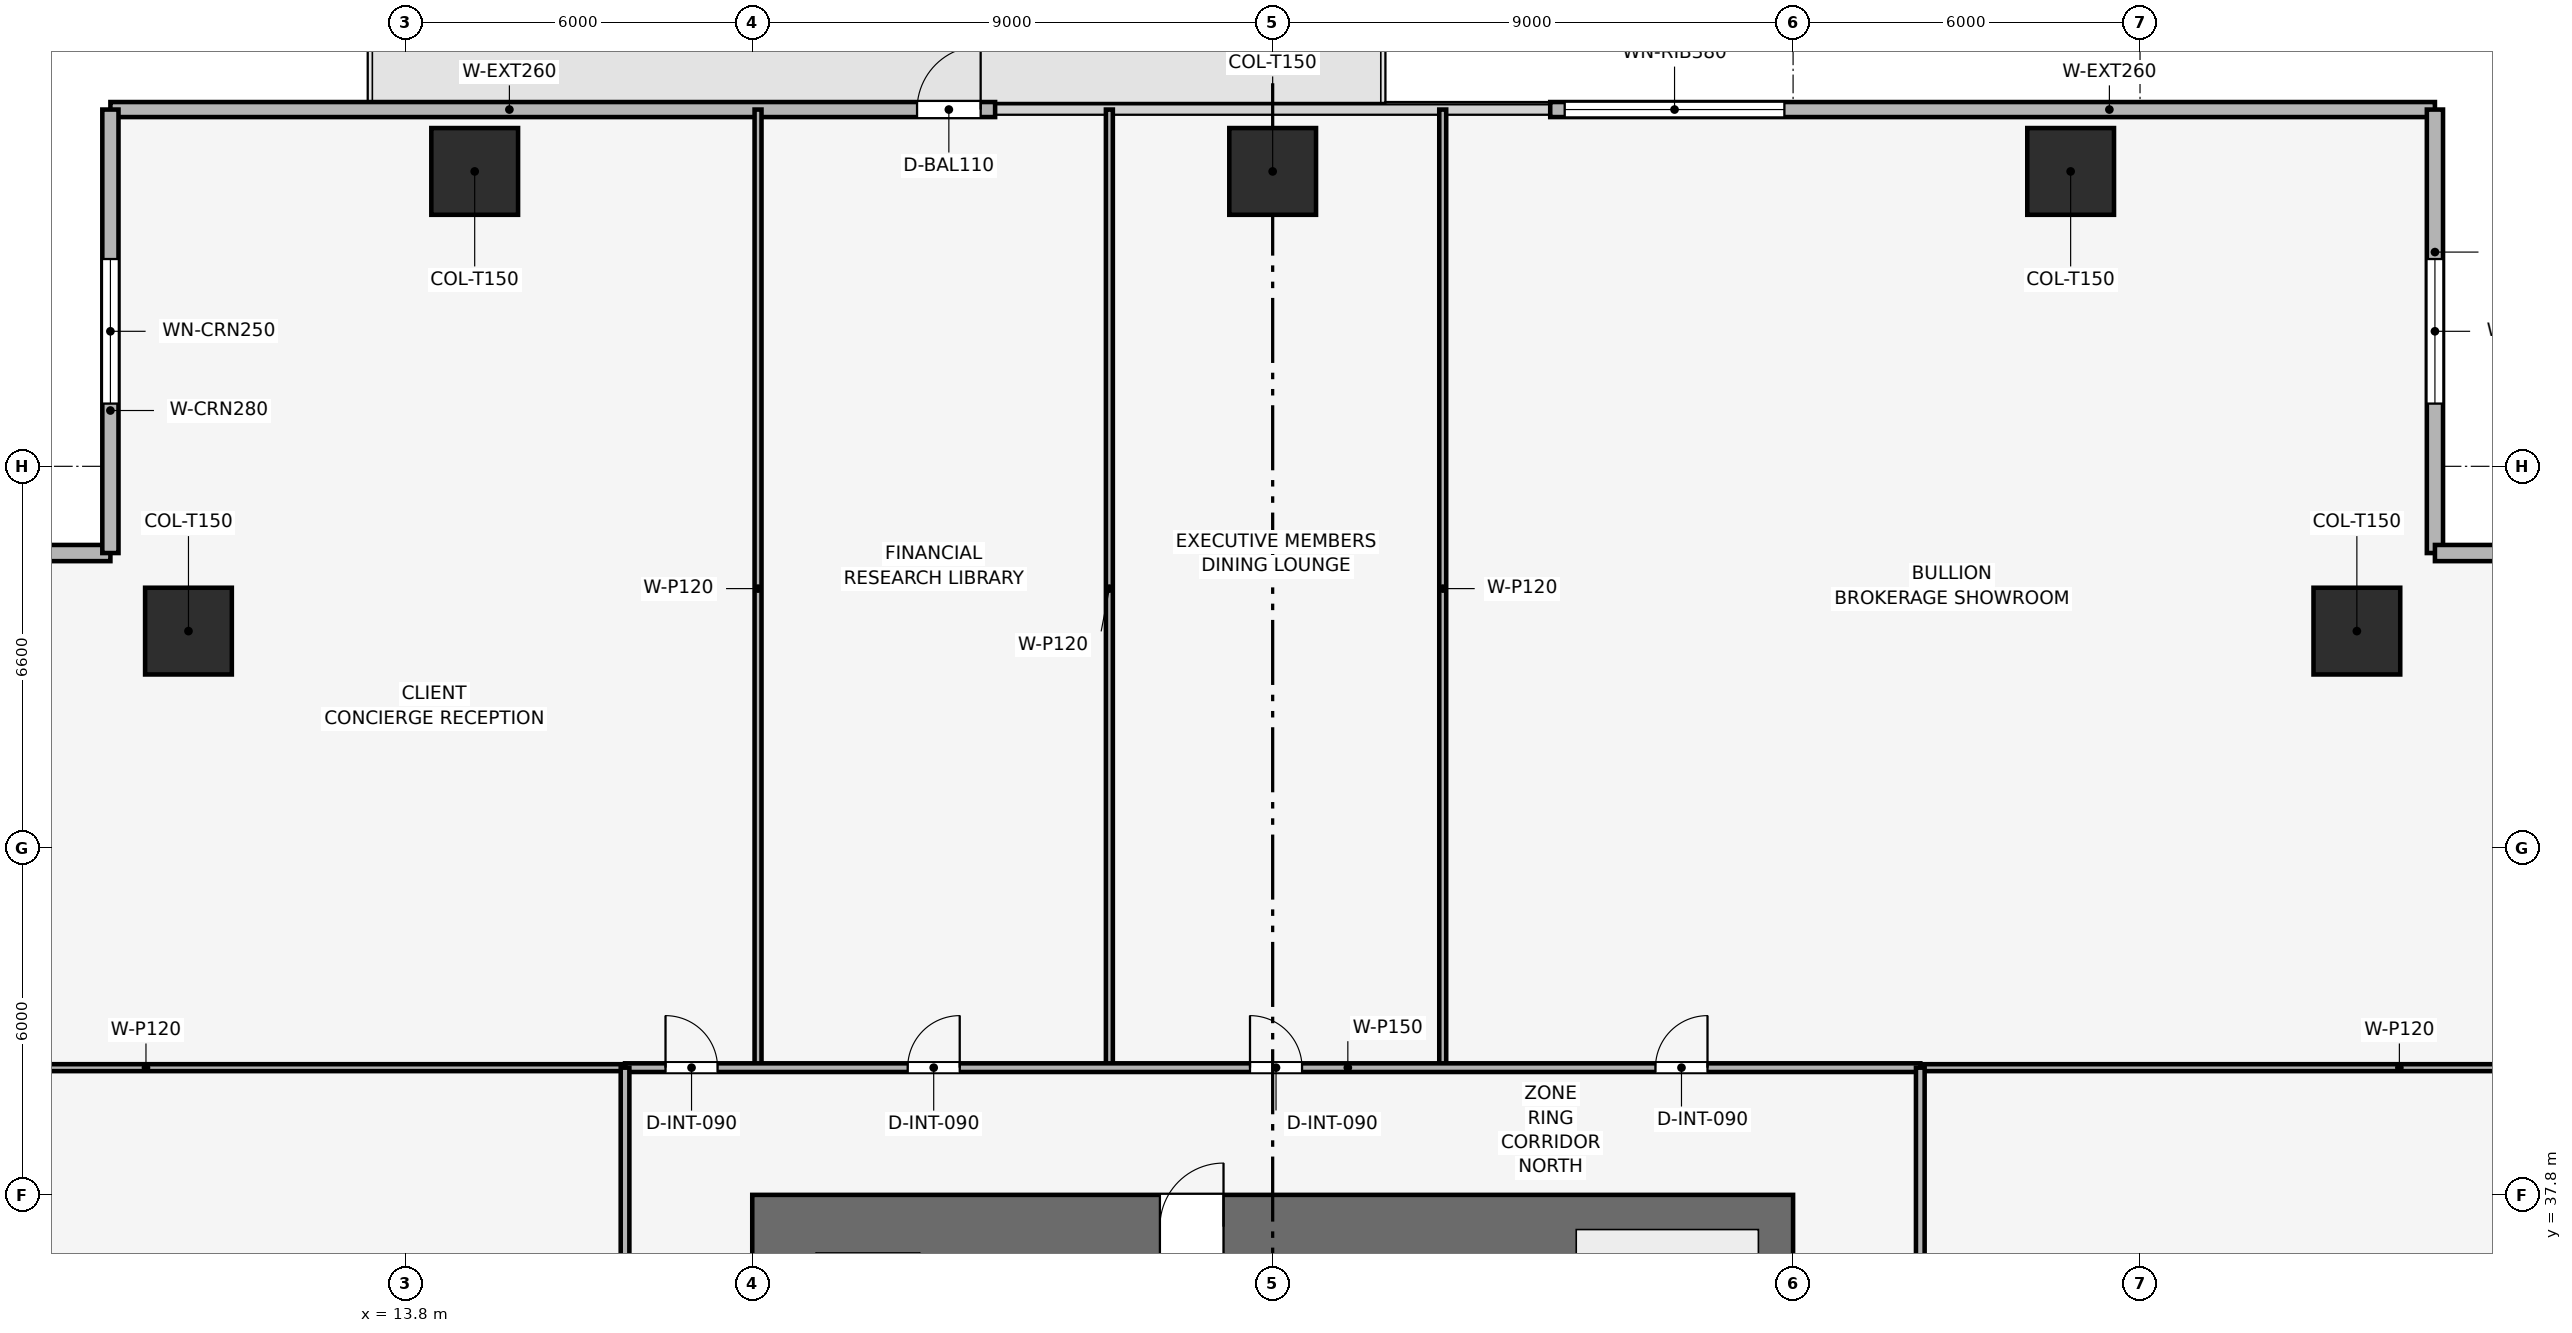
"""IFC4 building model, lengths in metres.
Left out: names, types, materials, properties, quantities, classifications, styles, units other than length and angle.
Written with IfcOpenShell. Run it as: python <this file> out.ifc"""

import sys

from ifc_helpers import new_model, si_unit, direction, frame, frame_2d, origin, origin_2d, place, context, subcontext, project, spatial, rectangle, extrude, element, fill, save


model = new_model("IFC4")
c1 = context("Model", 3, precision=1e-05, world=origin(), true_north=direction((0.0, 1.0)))
c2 = subcontext(c1, "Body", "Model", "MODEL_VIEW")
j1 = project(units=[si_unit("LENGTHUNIT", "METRE"), si_unit("PLANEANGLEUNIT", "RADIAN")], contexts=[c1])
p1 = place(None, origin())
s1 = spatial("IfcSite", under=j1, at=p1, CompositionType="ELEMENT")
p2 = place(p1, origin())
s2 = spatial("IfcBuilding", under=s1, at=p2, CompositionType="ELEMENT")
p3 = place(p2, frame((0.0, 0.0, 61.2)))
s3 = spatial("IfcBuildingStorey", under=s2, at=p3, CompositionType="ELEMENT", Elevation=61.2)
p4 = place(p3, frame((19.8, 37.25, 0.0), z_axis=(0.0, 0.0, 1.0), x_axis=(1.0, 0.0, 0.0)))
e1 = element("IfcWall", 1, at=p4, inside=s3, PredefinedType="SHEAR", context=c2, shape_type="SweptSolid", body=[
    extrude(rectangle(XDim=18.0, YDim=1.1, at=frame_2d((9.0, 0.0))), origin(), (0.0, 0.0, 1.0), 3.9),
])
p5 = place(p4, frame((7.05, 0.0, 0.0)))
e2 = element("IfcOpeningElement", 2, at=p5, cuts=e1, PredefinedType="OPENING", context=c2, shape_type="SweptSolid", body=[
    extrude(rectangle(XDim=1.1, YDim=2.15, at=frame_2d((0.55, 1.075))), frame((0.0, 0.56, 0.0), z_axis=(0.0, -1.0, 0.0), x_axis=(1.0, 0.0, 0.0)), (0.0, 0.0, 1.0), 1.12),
])
for number, where, z_axis, x_axis in (
    (3, (42.6, 55.5, 0.003), (0.0, 0.0, 1.0), (1.0, 0.0, 0.0)),
    (4, (28.8, 55.5, 0.003), (0.0, 0.0, 1.0), (1.0, 0.0, 0.0)),
    (5, (15.0, 55.5, 0.003), (0.0, 0.0, 1.0), (1.0, 0.0, 0.0)),
    (6, (47.55, 47.55, 0.003), (0.0, 0.0, 1.0), (1.0, 0.0, 0.0)),
    (7, (10.05, 47.55, 0.003), (0.0, 0.0, 1.0), (1.0, 0.0, 0.0)),
):
    element("IfcColumn", number, at=place(p3, frame(where, z_axis=z_axis, x_axis=x_axis)), inside=s3, PredefinedType="COLUMN", context=c2, shape_type="SweptSolid", body=[
        extrude(rectangle(XDim=1.5, YDim=1.5, at=origin_2d()), origin(), (0.0, 0.0, 1.0), 3.644),
    ])
p6 = place(p3, frame((8.7, 56.57, 0.0), z_axis=(0.0, 0.0, 1.0), x_axis=(1.0, 0.0, 0.0)))
e8 = element("IfcWall", 8, at=p6, inside=s3, PredefinedType="SOLIDWALL", context=c2, shape_type="SweptSolid", body=[
    extrude(rectangle(XDim=15.3, YDim=0.26, at=frame_2d((7.65, 0.0))), origin(), (0.0, 0.0, 1.0), 3.65),
])
p7 = place(p6, frame((13.95, 0.0, 0.0)))
e9 = element("IfcOpeningElement", 9, at=p7, cuts=e8, PredefinedType="OPENING", context=c2, shape_type="SweptSolid", body=[
    extrude(rectangle(XDim=1.1, YDim=2.2, at=frame_2d((0.55, 1.1))), frame((0.0, 0.14, 0.0), z_axis=(0.0, -1.0, 0.0), x_axis=(1.0, 0.0, 0.0)), (0.0, 0.0, 1.0), 0.28),
])
p8 = place(p3, frame((33.6, 56.57, 0.0), z_axis=(0.0, 0.0, 1.0), x_axis=(1.0, 0.0, 0.0)))
e10 = element("IfcWall", 10, at=p8, inside=s3, PredefinedType="SOLIDWALL", context=c2, shape_type="SweptSolid", body=[
    extrude(rectangle(XDim=15.3, YDim=0.26, at=frame_2d((7.65, 0.0))), origin(), (0.0, 0.0, 1.0), 3.65),
])
p9 = place(p8, frame((0.25, 0.0, 0.9)))
e11 = element("IfcOpeningElement", 11, at=p9, cuts=e10, PredefinedType="OPENING", context=c2, shape_type="SweptSolid", body=[
    extrude(rectangle(XDim=3.8, YDim=1.9, at=frame_2d((1.9, 0.95))), frame((0.0, 0.14, 0.0), z_axis=(0.0, -1.0, 0.0), x_axis=(1.0, 0.0, 0.0)), (0.0, 0.0, 1.0), 0.28),
])
p10 = place(p3, frame((1.03, 48.9, 0.0), z_axis=(0.0, 0.0, 1.0), x_axis=(1.0, 0.0, 0.0)))
e12 = element("IfcWall", 12, at=p10, inside=s3, PredefinedType="SOLIDWALL", context=c2, shape_type="SweptSolid", body=[
    extrude(rectangle(XDim=7.67, YDim=0.28, at=frame_2d((3.835, 0.0))), origin(), (0.0, 0.0, 1.0), 3.65),
])
p11 = place(p10, frame((2.585, 0.0, 0.9)))
e13 = element("IfcOpeningElement", 13, at=p11, cuts=e12, PredefinedType="OPENING", context=c2, shape_type="SweptSolid", body=[
    extrude(rectangle(XDim=2.5, YDim=1.9, at=frame_2d((1.25, 0.95))), frame((0.0, 0.15, 0.0), z_axis=(0.0, -1.0, 0.0), x_axis=(1.0, 0.0, 0.0)), (0.0, 0.0, 1.0), 0.3),
])
p12 = place(p3, frame((8.7, 48.9, 0.0), z_axis=(0.0, 0.0, 1.0), x_axis=(0.0, 1.0, 0.0)))
e14 = element("IfcWall", 14, at=p12, inside=s3, PredefinedType="SOLIDWALL", context=c2, shape_type="SweptSolid", body=[
    extrude(rectangle(XDim=7.67, YDim=0.28, at=frame_2d((3.835, 0.0))), origin(), (0.0, 0.0, 1.0), 3.65),
])
p13 = place(p12, frame((2.585, 0.0, 0.9)))
e15 = element("IfcOpeningElement", 15, at=p13, cuts=e14, PredefinedType="OPENING", context=c2, shape_type="SweptSolid", body=[
    extrude(rectangle(XDim=2.5, YDim=1.9, at=frame_2d((1.25, 0.95))), frame((0.0, 0.15, 0.0), z_axis=(0.0, -1.0, 0.0), x_axis=(1.0, 0.0, 0.0)), (0.0, 0.0, 1.0), 0.3),
])
p14 = place(p3, frame((48.9, 56.57, 0.0), z_axis=(0.0, 0.0, 1.0), x_axis=(0.0, -1.0, 0.0)))
e16 = element("IfcWall", 16, at=p14, inside=s3, PredefinedType="SOLIDWALL", context=c2, shape_type="SweptSolid", body=[
    extrude(rectangle(XDim=7.67, YDim=0.28, at=frame_2d((3.835, 0.0))), origin(), (0.0, 0.0, 1.0), 3.65),
])
p15 = place(p14, frame((2.585, 0.0, 0.9)))
e17 = element("IfcOpeningElement", 17, at=p15, cuts=e16, PredefinedType="OPENING", context=c2, shape_type="SweptSolid", body=[
    extrude(rectangle(XDim=2.5, YDim=1.9, at=frame_2d((1.25, 0.95))), frame((0.0, 0.15, 0.0), z_axis=(0.0, -1.0, 0.0), x_axis=(1.0, 0.0, 0.0)), (0.0, 0.0, 1.0), 0.3),
])
p16 = place(p3, frame((48.9, 48.9, 0.0), z_axis=(0.0, 0.0, 1.0), x_axis=(1.0, 0.0, 0.0)))
e18 = element("IfcWall", 18, at=p16, inside=s3, PredefinedType="SOLIDWALL", context=c2, shape_type="SweptSolid", body=[
    extrude(rectangle(XDim=7.67, YDim=0.28, at=frame_2d((3.835, 0.0))), origin(), (0.0, 0.0, 1.0), 3.65),
])
p17 = place(p16, frame((2.585, 0.0, 0.9)))
e19 = element("IfcOpeningElement", 19, at=p17, cuts=e18, PredefinedType="OPENING", context=c2, shape_type="SweptSolid", body=[
    extrude(rectangle(XDim=2.5, YDim=1.9, at=frame_2d((1.25, 0.95))), frame((0.0, 0.15, 0.0), z_axis=(0.0, -1.0, 0.0), x_axis=(1.0, 0.0, 0.0)), (0.0, 0.0, 1.0), 0.3),
])
for number, where, z_axis, x_axis in (
    (20, (19.9, 40.0, 0.0), (0.0, 0.0, 1.0), (0.0, 1.0, 0.0)),
    (21, (25.976, 40.0, 0.0), (0.0, 0.0, 1.0), (0.0, 1.0, 0.0)),
    (22, (31.741, 40.0, 0.0), (0.0, 0.0, 1.0), (0.0, 1.0, 0.0)),
    (23, (1.03, 40.0, 0.0), (0.0, 0.0, 1.0), (1.0, 0.0, 0.0)),
    (24, (40.0, 40.0, 0.0), (0.0, 0.0, 1.0), (1.0, 0.0, 0.0)),
):
    element("IfcWall", number, at=place(p3, frame(where, z_axis=z_axis, x_axis=x_axis)), inside=s3, PredefinedType="PARTITIONING", context=c2, shape_type="SweptSolid", body=[
        extrude(rectangle(XDim=16.57, YDim=0.12, at=frame_2d((8.285, 0.0))), origin(), (0.0, 0.0, 1.0), 2.935),
    ])
p18 = place(p3, frame((17.6, 40.0, 0.0), z_axis=(0.0, 0.0, 1.0), x_axis=(1.0, 0.0, 0.0)))
e25 = element("IfcWall", 25, at=p18, inside=s3, PredefinedType="PARTITIONING", context=c2, shape_type="SweptSolid", body=[
    extrude(rectangle(XDim=22.4, YDim=0.15, at=frame_2d((11.2, 0.0))), origin(), (0.0, 0.0, 1.0), 3.085),
])
p19 = place(p18, frame((0.7, 0.0, 0.0)))
e26 = element("IfcOpeningElement", 26, at=p19, cuts=e25, PredefinedType="OPENING", context=c2, shape_type="SweptSolid", body=[
    extrude(rectangle(XDim=0.9, YDim=2.1, at=frame_2d((0.45, 1.05))), frame((0.0, 0.085, 0.0), z_axis=(0.0, -1.0, 0.0), x_axis=(1.0, 0.0, 0.0)), (0.0, 0.0, 1.0), 0.17),
])
p20 = place(p18, frame((4.888, 0.0, 0.0)))
e27 = element("IfcOpeningElement", 27, at=p20, cuts=e25, PredefinedType="OPENING", context=c2, shape_type="SweptSolid", body=[
    extrude(rectangle(XDim=0.9, YDim=2.1, at=frame_2d((0.45, 1.05))), frame((0.0, 0.085, 0.0), z_axis=(0.0, -1.0, 0.0), x_axis=(1.0, 0.0, 0.0)), (0.0, 0.0, 1.0), 0.17),
])
p21 = place(p18, frame((10.808, 0.0, 0.0)))
e28 = element("IfcOpeningElement", 28, at=p21, cuts=e25, PredefinedType="OPENING", context=c2, shape_type="SweptSolid", body=[
    extrude(rectangle(XDim=0.9, YDim=2.1, at=frame_2d((0.45, 1.05))), frame((0.0, 0.085, 0.0), z_axis=(0.0, -1.0, 0.0), x_axis=(1.0, 0.0, 0.0)), (0.0, 0.0, 1.0), 0.17),
])
p22 = place(p18, frame((17.82, 0.0, 0.0)))
e29 = element("IfcOpeningElement", 29, at=p22, cuts=e25, PredefinedType="OPENING", context=c2, shape_type="SweptSolid", body=[
    extrude(rectangle(XDim=0.9, YDim=2.1, at=frame_2d((0.45, 1.05))), frame((0.0, 0.085, 0.0), z_axis=(0.0, -1.0, 0.0), x_axis=(1.0, 0.0, 0.0)), (0.0, 0.0, 1.0), 0.17),
])
p23 = place(p3, frame((17.6, 17.6, 0.0), z_axis=(0.0, 0.0, 1.0), x_axis=(0.0, 1.0, 0.0)))
e30 = element("IfcWall", 30, at=p23, inside=s3, PredefinedType="PARTITIONING", context=c2, shape_type="SweptSolid", body=[
    extrude(rectangle(XDim=22.4, YDim=0.15, at=frame_2d((11.2, 0.0))), origin(), (0.0, 0.0, 1.0), 3.085),
])
p24 = place(p23, frame((2.48, 0.0, 0.0)))
e31 = element("IfcOpeningElement", 31, at=p24, cuts=e30, PredefinedType="OPENING", context=c2, shape_type="SweptSolid", body=[
    extrude(rectangle(XDim=0.9, YDim=2.1, at=frame_2d((0.45, 1.05))), frame((0.0, 0.085, 0.0), z_axis=(0.0, -1.0, 0.0), x_axis=(1.0, 0.0, 0.0)), (0.0, 0.0, 1.0), 0.17),
])
p25 = place(p23, frame((13.68, 0.0, 0.0)))
e32 = element("IfcOpeningElement", 32, at=p25, cuts=e30, PredefinedType="OPENING", context=c2, shape_type="SweptSolid", body=[
    extrude(rectangle(XDim=0.9, YDim=2.1, at=frame_2d((0.45, 1.05))), frame((0.0, 0.085, 0.0), z_axis=(0.0, -1.0, 0.0), x_axis=(1.0, 0.0, 0.0)), (0.0, 0.0, 1.0), 0.17),
])
p26 = place(p3, frame((40.0, 17.6, 0.0), z_axis=(0.0, 0.0, 1.0), x_axis=(0.0, 1.0, 0.0)))
e33 = element("IfcWall", 33, at=p26, inside=s3, PredefinedType="PARTITIONING", context=c2, shape_type="SweptSolid", body=[
    extrude(rectangle(XDim=22.4, YDim=0.15, at=frame_2d((11.2, 0.0))), origin(), (0.0, 0.0, 1.0), 3.085),
])
p27 = place(p26, frame((0.85, 0.0, 0.0)))
e34 = element("IfcOpeningElement", 34, at=p27, cuts=e33, PredefinedType="OPENING", context=c2, shape_type="SweptSolid", body=[
    extrude(rectangle(XDim=0.9, YDim=2.1, at=frame_2d((0.45, 1.05))), frame((0.0, 0.085, 0.0), z_axis=(0.0, -1.0, 0.0), x_axis=(1.0, 0.0, 0.0)), (0.0, 0.0, 1.0), 0.17),
])
p28 = place(p26, frame((3.55, 0.0, 0.0)))
e35 = element("IfcOpeningElement", 35, at=p28, cuts=e33, PredefinedType="OPENING", context=c2, shape_type="SweptSolid", body=[
    extrude(rectangle(XDim=0.9, YDim=2.1, at=frame_2d((0.45, 1.05))), frame((0.0, 0.085, 0.0), z_axis=(0.0, -1.0, 0.0), x_axis=(1.0, 0.0, 0.0)), (0.0, 0.0, 1.0), 0.17),
])
p29 = place(p26, frame((6.45, 0.0, 0.0)))
e36 = element("IfcOpeningElement", 36, at=p29, cuts=e33, PredefinedType="OPENING", context=c2, shape_type="SweptSolid", body=[
    extrude(rectangle(XDim=0.9, YDim=2.1, at=frame_2d((0.45, 1.05))), frame((0.0, 0.085, 0.0), z_axis=(0.0, -1.0, 0.0), x_axis=(1.0, 0.0, 0.0)), (0.0, 0.0, 1.0), 0.17),
])
p30 = place(p26, frame((9.2, 0.0, 0.0)))
e37 = element("IfcOpeningElement", 37, at=p30, cuts=e33, PredefinedType="OPENING", context=c2, shape_type="SweptSolid", body=[
    extrude(rectangle(XDim=0.95, YDim=2.1, at=frame_2d((0.475, 1.05))), frame((0.0, 0.085, 0.0), z_axis=(0.0, -1.0, 0.0), x_axis=(1.0, 0.0, 0.0)), (0.0, 0.0, 1.0), 0.17),
])
p31 = place(p26, frame((16.25, 0.0, 0.0)))
e38 = element("IfcOpeningElement", 38, at=p31, cuts=e33, PredefinedType="OPENING", context=c2, shape_type="SweptSolid", body=[
    extrude(rectangle(XDim=0.9, YDim=2.1, at=frame_2d((0.45, 1.05))), frame((0.0, 0.085, 0.0), z_axis=(0.0, -1.0, 0.0), x_axis=(1.0, 0.0, 0.0)), (0.0, 0.0, 1.0), 0.17),
])
p32 = place(p7, origin())
e39 = element("IfcDoor", 39, at=p32, inside=s3, OperationType="SINGLE_SWING_RIGHT", PredefinedType="DOOR", context=c2, shape_type="SweptSolid", body=[
    extrude(rectangle(XDim=1.1, YDim=2.2, at=frame_2d((0.55, 1.1))), frame((0.0, 0.025, 0.0), z_axis=(0.0, -1.0, 0.0), x_axis=(1.0, 0.0, 0.0)), (0.0, 0.0, 1.0), 0.05),
])
fill(e9, e39)
p33 = place(p9, origin())
e40 = element("IfcWindow", 40, at=p33, inside=s3, PartitioningType="SINGLE_PANEL", PredefinedType="WINDOW", context=c2, shape_type="SweptSolid", body=[
    extrude(rectangle(XDim=3.8, YDim=1.9, at=frame_2d((1.9, 0.95))), frame((0.0, 0.03, 0.0), z_axis=(0.0, -1.0, 0.0), x_axis=(1.0, 0.0, 0.0)), (0.0, 0.0, 1.0), 0.06),
])
fill(e11, e40)
p34 = place(p13, origin())
e41 = element("IfcWindow", 41, at=p34, inside=s3, PartitioningType="SINGLE_PANEL", PredefinedType="WINDOW", context=c2, shape_type="SweptSolid", body=[
    extrude(rectangle(XDim=2.5, YDim=1.9, at=frame_2d((1.25, 0.95))), frame((0.0, 0.03, 0.0), z_axis=(0.0, -1.0, 0.0), x_axis=(1.0, 0.0, 0.0)), (0.0, 0.0, 1.0), 0.06),
])
fill(e15, e41)
p35 = place(p15, origin())
e42 = element("IfcWindow", 42, at=p35, inside=s3, PartitioningType="SINGLE_PANEL", PredefinedType="WINDOW", context=c2, shape_type="SweptSolid", body=[
    extrude(rectangle(XDim=2.5, YDim=1.9, at=frame_2d((1.25, 0.95))), frame((0.0, 0.03, 0.0), z_axis=(0.0, -1.0, 0.0), x_axis=(1.0, 0.0, 0.0)), (0.0, 0.0, 1.0), 0.06),
])
fill(e17, e42)
p36 = place(p19, origin())
e43 = element("IfcDoor", 43, at=p36, inside=s3, OperationType="SINGLE_SWING_LEFT", PredefinedType="DOOR", context=c2, shape_type="SweptSolid", body=[
    extrude(rectangle(XDim=0.9, YDim=2.1, at=frame_2d((0.45, 1.05))), frame((0.0, 0.025, 0.0), z_axis=(0.0, -1.0, 0.0), x_axis=(1.0, 0.0, 0.0)), (0.0, 0.0, 1.0), 0.05),
])
fill(e26, e43)
p37 = place(p20, origin())
e44 = element("IfcDoor", 44, at=p37, inside=s3, OperationType="SINGLE_SWING_RIGHT", PredefinedType="DOOR", context=c2, shape_type="SweptSolid", body=[
    extrude(rectangle(XDim=0.9, YDim=2.1, at=frame_2d((0.45, 1.05))), frame((0.0, 0.025, 0.0), z_axis=(0.0, -1.0, 0.0), x_axis=(1.0, 0.0, 0.0)), (0.0, 0.0, 1.0), 0.05),
])
fill(e27, e44)
p38 = place(p21, origin())
e45 = element("IfcDoor", 45, at=p38, inside=s3, OperationType="SINGLE_SWING_LEFT", PredefinedType="DOOR", context=c2, shape_type="SweptSolid", body=[
    extrude(rectangle(XDim=0.9, YDim=2.1, at=frame_2d((0.45, 1.05))), frame((0.0, 0.025, 0.0), z_axis=(0.0, -1.0, 0.0), x_axis=(1.0, 0.0, 0.0)), (0.0, 0.0, 1.0), 0.05),
])
fill(e28, e45)
p39 = place(p22, origin())
e46 = element("IfcDoor", 46, at=p39, inside=s3, OperationType="SINGLE_SWING_RIGHT", PredefinedType="DOOR", context=c2, shape_type="SweptSolid", body=[
    extrude(rectangle(XDim=0.9, YDim=2.1, at=frame_2d((0.45, 1.05))), frame((0.0, 0.025, 0.0), z_axis=(0.0, -1.0, 0.0), x_axis=(1.0, 0.0, 0.0)), (0.0, 0.0, 1.0), 0.05),
])
fill(e29, e46)
p40 = place(p5, origin())
e47 = element("IfcDoor", 47, at=p40, inside=s3, OperationType="SINGLE_SWING_RIGHT", PredefinedType="DOOR", context=c2, shape_type="SweptSolid", body=[
    extrude(rectangle(XDim=1.1, YDim=2.15, at=frame_2d((0.55, 1.075))), frame((0.0, 0.025, 0.0), z_axis=(0.0, -1.0, 0.0), x_axis=(1.0, 0.0, 0.0)), (0.0, 0.0, 1.0), 0.05),
])
fill(e2, e47)
save(model, sys.argv[1])
